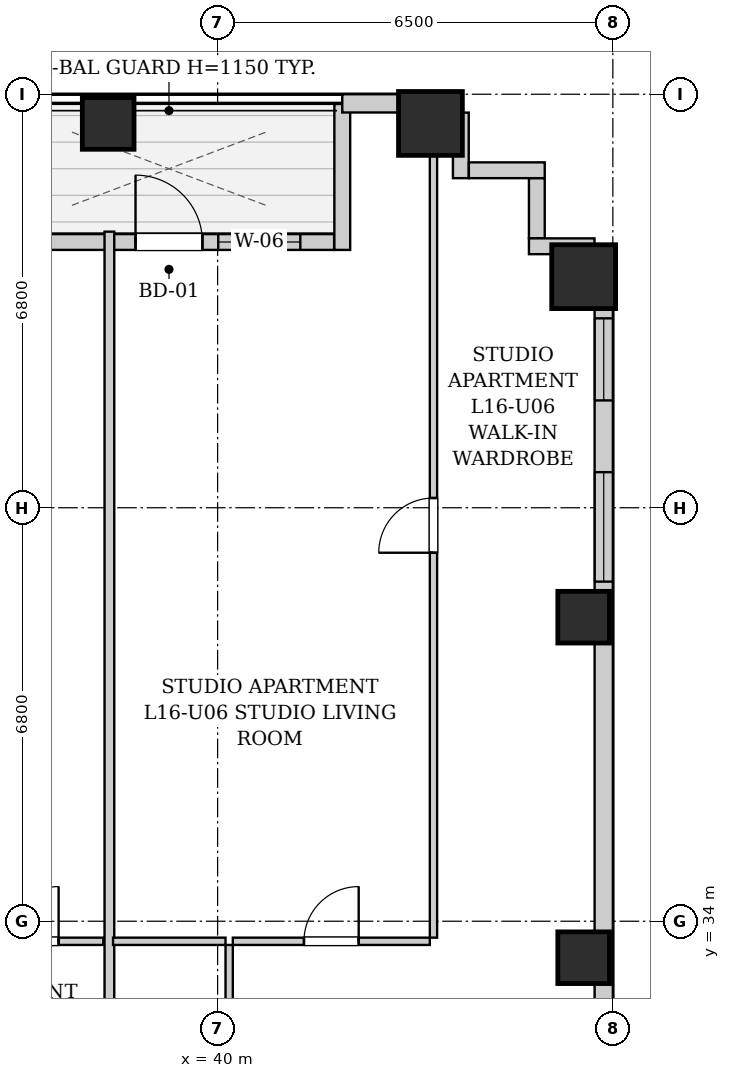
"""IFC4 building model, lengths in metres.
Left out: names, types, materials, properties, quantities, classifications, styles, units other than length and angle.
Written with IfcOpenShell. Run it as: python <this file> out.ifc"""

import sys

from ifc_helpers import new_model, si_unit, direction, frame, frame_2d, origin, origin_2d, place, context, subcontext, project, spatial, rectangle, extrude, element, fill, save


model = new_model("IFC4")
c1 = context("Model", 3, precision=1e-05, world=origin(), true_north=direction((0.0, 1.0)))
c2 = subcontext(c1, "Body", "Model", "MODEL_VIEW")
j1 = project(units=[si_unit("LENGTHUNIT", "METRE"), si_unit("PLANEANGLEUNIT", "RADIAN")], contexts=[c1])
p1 = place(None, origin())
s1 = spatial("IfcSite", under=j1, at=p1, CompositionType="ELEMENT")
p2 = place(p1, origin())
s2 = spatial("IfcBuilding", under=s1, at=p2, CompositionType="ELEMENT")
p3 = place(p2, frame((0.0, 0.0, 61.0)))
s3 = spatial("IfcBuildingStorey", under=s2, at=p3, CompositionType="ELEMENT", Elevation=61.0)
p4 = place(p3, frame((38.2, 47.12, 0.0), z_axis=(0.0, 0.0, 1.0), x_axis=(1.0, 0.0, 0.0)))
e1 = element("IfcColumn", 1, at=p4, inside=s3, PredefinedType="COLUMN", context=c2, shape_type="SweptSolid", body=[
    extrude(rectangle(XDim=0.85, YDim=0.85, at=origin_2d()), origin(), (0.0, 0.0, 1.0), 3.2),
])
p5 = place(p3, frame((43.5, 47.12, 0.0), z_axis=(0.0, 0.0, 1.0), x_axis=(1.0, 0.0, 0.0)))
e2 = element("IfcColumn", 2, at=p5, inside=s3, PredefinedType="COLUMN", context=c2, shape_type="SweptSolid", body=[
    extrude(rectangle(XDim=1.05, YDim=1.05, at=origin_2d()), origin(), (0.0, 0.0, 1.0), 3.2),
])
for number, where, z_axis, x_axis in (
    (3, (46.02, 33.4, 0.0), (0.0, 0.0, 1.0), (1.0, 0.0, 0.0)),
    (4, (46.02, 39.0, 0.0), (0.0, 0.0, 1.0), (1.0, 0.0, 0.0)),
):
    element("IfcColumn", number, at=place(p3, frame(where, z_axis=z_axis, x_axis=x_axis)), inside=s3, PredefinedType="COLUMN", context=c2, shape_type="SweptSolid", body=[
        extrude(rectangle(XDim=0.85, YDim=0.85, at=origin_2d()), origin(), (0.0, 0.0, 1.0), 3.2),
    ])
p6 = place(p3, frame((46.02, 44.6, 0.0), z_axis=(0.0, 0.0, 1.0), x_axis=(1.0, 0.0, 0.0)))
e5 = element("IfcColumn", 5, at=p6, inside=s3, PredefinedType="COLUMN", context=c2, shape_type="SweptSolid", body=[
    extrude(rectangle(XDim=1.05, YDim=1.05, at=origin_2d()), origin(), (0.0, 0.0, 1.0), 3.2),
])
p7 = place(p3, frame((36.484, 45.17, 0.0), z_axis=(0.0, 0.0, 1.0), x_axis=(1.0, 0.0, 0.0)))
e6 = element("IfcWall", 6, at=p7, inside=s3, PredefinedType="SOLIDWALL", context=c2, shape_type="SweptSolid", body=[
    extrude(rectangle(XDim=5.432, YDim=0.26, at=frame_2d((2.716, 0.0))), origin(), (0.0, 0.0, 1.0), 2.94),
])
p8 = place(p7, frame((2.166, 0.0, 0.0)))
e7 = element("IfcOpeningElement", 7, at=p8, cuts=e6, PredefinedType="OPENING", context=c2, shape_type="SweptSolid", body=[
    extrude(rectangle(XDim=1.1, YDim=2.0, at=frame_2d((0.55, 1.0))), frame((0.0, 0.14, 0.0), z_axis=(0.0, -1.0, 0.0), x_axis=(1.0, 0.0, 0.0)), (0.0, 0.0, 1.0), 0.28),
])
p9 = place(p7, frame((3.526, 0.0, 0.85)))
e8 = element("IfcOpeningElement", 8, at=p9, cuts=e6, PredefinedType="OPENING", context=c2, shape_type="SweptSolid", body=[
    extrude(rectangle(XDim=1.35, YDim=1.65, at=frame_2d((0.675, 0.825))), frame((0.0, 0.14, 0.0), z_axis=(0.0, -1.0, 0.0), x_axis=(1.0, 0.0, 0.0)), (0.0, 0.0, 1.0), 0.28),
])
p10 = place(p3, frame((42.05, 45.04, 0.0), z_axis=(0.0, 0.0, 1.0), x_axis=(0.0, 1.0, 0.0)))
e9 = element("IfcWall", 9, at=p10, inside=s3, PredefinedType="SOLIDWALL", context=c2, shape_type="SweptSolid", body=[
    extrude(rectangle(XDim=2.4, YDim=0.26, at=frame_2d((1.2, 0.0))), origin(), (0.0, 0.0, 1.0), 2.94),
])
p11 = place(p3, frame((42.05, 47.45, 0.0), z_axis=(0.0, 0.0, 1.0), x_axis=(1.0, 0.0, 0.0)))
e10 = element("IfcWall", 10, at=p11, inside=s3, PredefinedType="SOLIDWALL", context=c2, shape_type="SweptSolid", body=[
    extrude(rectangle(XDim=1.95, YDim=0.3, at=frame_2d((0.975, 0.0))), origin(), (0.0, 0.0, 1.0), 1.975),
])
p12 = place(p3, frame((46.35, 45.1, 0.0), z_axis=(0.0, 0.0, 1.0), x_axis=(0.0, -1.0, 0.0)))
e11 = element("IfcWall", 11, at=p12, inside=s3, PredefinedType="SOLIDWALL", context=c2, shape_type="SweptSolid", body=[
    extrude(rectangle(XDim=16.9, YDim=0.3, at=frame_2d((8.45, 0.0))), origin(), (0.0, 0.0, 1.0), 1.975),
])
p13 = place(p12, frame((3.715, 0.0, 0.55)))
e12 = element("IfcOpeningElement", 12, at=p13, cuts=e11, PredefinedType="OPENING", context=c2, shape_type="SweptSolid", body=[
    extrude(rectangle(XDim=1.8, YDim=1.2, at=frame_2d((0.9, 0.6))), frame((0.0, 0.16, 0.0), z_axis=(0.0, -1.0, 0.0), x_axis=(1.0, 0.0, 0.0)), (0.0, 0.0, 1.0), 0.32),
])
p14 = place(p12, frame((1.185, 0.0, 0.55)))
e13 = element("IfcOpeningElement", 13, at=p14, cuts=e11, PredefinedType="OPENING", context=c2, shape_type="SweptSolid", body=[
    extrude(rectangle(XDim=1.35, YDim=1.2, at=frame_2d((0.675, 0.6))), frame((0.0, 0.16, 0.0), z_axis=(0.0, -1.0, 0.0), x_axis=(1.0, 0.0, 0.0)), (0.0, 0.0, 1.0), 0.32),
])
p15 = place(p3, frame((44.0, 47.298, 0.0), z_axis=(0.0, 0.0, 1.0), x_axis=(0.0, -1.0, 0.0)))
e14 = element("IfcWall", 14, at=p15, inside=s3, PredefinedType="SOLIDWALL", context=c2, shape_type="SweptSolid", body=[
    extrude(rectangle(XDim=1.078, YDim=0.26, at=frame_2d((0.539, 0.0))), origin(), (0.0, 0.0, 1.0), 2.94),
])
p16 = place(p3, frame((44.132, 46.35, 0.0), z_axis=(0.0, 0.0, 1.0), x_axis=(1.0, 0.0, 0.0)))
e15 = element("IfcWall", 15, at=p16, inside=s3, PredefinedType="SOLIDWALL", context=c2, shape_type="SweptSolid", body=[
    extrude(rectangle(XDim=1.248, YDim=0.26, at=frame_2d((0.624, 0.0))), origin(), (0.0, 0.0, 1.0), 2.94),
])
p17 = place(p3, frame((45.25, 46.218, 0.0), z_axis=(0.0, 0.0, 1.0), x_axis=(0.0, -1.0, 0.0)))
e16 = element("IfcWall", 16, at=p17, inside=s3, PredefinedType="SOLIDWALL", context=c2, shape_type="SweptSolid", body=[
    extrude(rectangle(XDim=0.986, YDim=0.26, at=frame_2d((0.493, 0.0))), origin(), (0.0, 0.0, 1.0), 2.94),
])
p18 = place(p3, frame((45.12, 45.1, 0.0), z_axis=(0.0, 0.0, 1.0), x_axis=(1.0, 0.0, 0.0)))
e17 = element("IfcWall", 17, at=p18, inside=s3, PredefinedType="SOLIDWALL", context=c2, shape_type="SweptSolid", body=[
    extrude(rectangle(XDim=1.078, YDim=0.26, at=frame_2d((0.539, 0.0))), origin(), (0.0, 0.0, 1.0), 2.94),
])
p19 = place(p3, frame((35.75, 33.67, 0.0), z_axis=(0.0, 0.0, 1.0), x_axis=(1.0, 0.0, 0.0)))
e18 = element("IfcWall", 18, at=p19, inside=s3, PredefinedType="PARTITIONING", context=c2, shape_type="SweptSolid", body=[
    extrude(rectangle(XDim=2.37, YDim=0.12, at=frame_2d((1.185, 0.0))), origin(), (0.0, 0.0, 1.0), 2.94),
])
p20 = place(p19, frame((0.735, 0.0, 0.0)))
e19 = element("IfcOpeningElement", 19, at=p20, cuts=e18, PredefinedType="OPENING", context=c2, shape_type="SweptSolid", body=[
    extrude(rectangle(XDim=0.9, YDim=2.05, at=frame_2d((0.45, 1.025))), frame((0.0, 0.07, 0.0), z_axis=(0.0, -1.0, 0.0), x_axis=(1.0, 0.0, 0.0)), (0.0, 0.0, 1.0), 0.14),
])
p21 = place(p3, frame((38.22, 30.76, 0.0), z_axis=(0.0, 0.0, 1.0), x_axis=(0.0, 1.0, 0.0)))
e20 = element("IfcWall", 20, at=p21, inside=s3, PredefinedType="PARTITIONING", context=c2, shape_type="SweptSolid", body=[
    extrude(rectangle(XDim=14.58, YDim=0.16, at=frame_2d((7.29, 0.0))), origin(), (0.0, 0.0, 1.0), 2.94),
])
p22 = place(p3, frame((40.19, 30.76, 0.0), z_axis=(0.0, 0.0, 1.0), x_axis=(0.0, 1.0, 0.0)))
e21 = element("IfcWall", 21, at=p22, inside=s3, PredefinedType="PARTITIONING", context=c2, shape_type="SweptSolid", body=[
    extrude(rectangle(XDim=2.85, YDim=0.12, at=frame_2d((1.425, 0.0))), origin(), (0.0, 0.0, 1.0), 2.94),
])
p23 = place(p22, frame((0.995, 0.0, 0.0)))
e22 = element("IfcOpeningElement", 22, at=p23, cuts=e21, PredefinedType="OPENING", context=c2, shape_type="SweptSolid", body=[
    extrude(rectangle(XDim=0.86, YDim=2.05, at=frame_2d((0.43, 1.025))), frame((0.0, 0.07, 0.0), z_axis=(0.0, -1.0, 0.0), x_axis=(1.0, 0.0, 0.0)), (0.0, 0.0, 1.0), 0.14),
])
p24 = place(p3, frame((38.28, 33.67, 0.0), z_axis=(0.0, 0.0, 1.0), x_axis=(1.0, 0.0, 0.0)))
e23 = element("IfcWall", 23, at=p24, inside=s3, PredefinedType="PARTITIONING", context=c2, shape_type="SweptSolid", body=[
    extrude(rectangle(XDim=1.85, YDim=0.12, at=frame_2d((0.925, 0.0))), origin(), (0.0, 0.0, 1.0), 2.94),
])
p25 = place(p3, frame((40.25, 33.67, 0.0), z_axis=(0.0, 0.0, 1.0), x_axis=(1.0, 0.0, 0.0)))
e24 = element("IfcWall", 24, at=p25, inside=s3, PredefinedType="PARTITIONING", context=c2, shape_type="SweptSolid", body=[
    extrude(rectangle(XDim=3.24, YDim=0.12, at=frame_2d((1.62, 0.0))), origin(), (0.0, 0.0, 1.0), 2.94),
])
p26 = place(p25, frame((1.17, 0.0, 0.0)))
e25 = element("IfcOpeningElement", 25, at=p26, cuts=e24, PredefinedType="OPENING", context=c2, shape_type="SweptSolid", body=[
    extrude(rectangle(XDim=0.9, YDim=2.05, at=frame_2d((0.45, 1.025))), frame((0.0, 0.07, 0.0), z_axis=(0.0, -1.0, 0.0), x_axis=(1.0, 0.0, 0.0)), (0.0, 0.0, 1.0), 0.14),
])
p27 = place(p3, frame((43.55, 33.73, 0.0), z_axis=(0.0, 0.0, 1.0), x_axis=(0.0, 1.0, 0.0)))
e26 = element("IfcWall", 26, at=p27, inside=s3, PredefinedType="PARTITIONING", context=c2, shape_type="SweptSolid", body=[
    extrude(rectangle(XDim=13.59, YDim=0.12, at=frame_2d((6.795, 0.0))), origin(), (0.0, 0.0, 1.0), 2.94),
])
p28 = place(p27, frame((6.33, 0.0, 0.0)))
e27 = element("IfcOpeningElement", 27, at=p28, cuts=e26, PredefinedType="OPENING", context=c2, shape_type="SweptSolid", body=[
    extrude(rectangle(XDim=0.9, YDim=2.05, at=frame_2d((0.45, 1.025))), frame((0.0, 0.07, 0.0), z_axis=(0.0, -1.0, 0.0), x_axis=(1.0, 0.0, 0.0)), (0.0, 0.0, 1.0), 0.14),
])
p29 = place(p20, origin())
e28 = element("IfcDoor", 28, at=p29, inside=s3, OperationType="SINGLE_SWING_RIGHT", PredefinedType="DOOR", context=c2, shape_type="SweptSolid", body=[
    extrude(rectangle(XDim=0.9, YDim=2.05, at=frame_2d((0.45, 1.025))), frame((0.0, 0.025, 0.0), z_axis=(0.0, -1.0, 0.0), x_axis=(1.0, 0.0, 0.0)), (0.0, 0.0, 1.0), 0.05),
])
fill(e19, e28)
p30 = place(p26, origin())
e29 = element("IfcDoor", 29, at=p30, inside=s3, OperationType="SINGLE_SWING_RIGHT", PredefinedType="DOOR", context=c2, shape_type="SweptSolid", body=[
    extrude(rectangle(XDim=0.9, YDim=2.05, at=frame_2d((0.45, 1.025))), frame((0.0, 0.025, 0.0), z_axis=(0.0, -1.0, 0.0), x_axis=(1.0, 0.0, 0.0)), (0.0, 0.0, 1.0), 0.05),
])
fill(e25, e29)
p31 = place(p28, origin())
e30 = element("IfcDoor", 30, at=p31, inside=s3, OperationType="SINGLE_SWING_LEFT", PredefinedType="DOOR", context=c2, shape_type="SweptSolid", body=[
    extrude(rectangle(XDim=0.9, YDim=2.05, at=frame_2d((0.45, 1.025))), frame((0.0, 0.025, 0.0), z_axis=(0.0, -1.0, 0.0), x_axis=(1.0, 0.0, 0.0)), (0.0, 0.0, 1.0), 0.05),
])
fill(e27, e30)
p32 = place(p8, origin())
e31 = element("IfcDoor", 31, at=p32, inside=s3, OperationType="SINGLE_SWING_LEFT", PredefinedType="DOOR", context=c2, shape_type="SweptSolid", body=[
    extrude(rectangle(XDim=1.1, YDim=2.0, at=frame_2d((0.55, 1.0))), frame((0.0, 0.025, 0.0), z_axis=(0.0, -1.0, 0.0), x_axis=(1.0, 0.0, 0.0)), (0.0, 0.0, 1.0), 0.05),
])
fill(e7, e31)
p33 = place(p9, origin())
e32 = element("IfcWindow", 32, at=p33, inside=s3, PartitioningType="SINGLE_PANEL", PredefinedType="WINDOW", context=c2, shape_type="SweptSolid", body=[
    extrude(rectangle(XDim=1.35, YDim=1.65, at=frame_2d((0.675, 0.825))), frame((0.0, 0.03, 0.0), z_axis=(0.0, -1.0, 0.0), x_axis=(1.0, 0.0, 0.0)), (0.0, 0.0, 1.0), 0.06),
])
fill(e8, e32)
p34 = place(p13, origin())
e33 = element("IfcWindow", 33, at=p34, inside=s3, PartitioningType="DOUBLE_PANEL_VERTICAL", PredefinedType="WINDOW", context=c2, shape_type="SweptSolid", body=[
    extrude(rectangle(XDim=1.8, YDim=1.2, at=frame_2d((0.9, 0.6))), frame((0.0, 0.03, 0.0), z_axis=(0.0, -1.0, 0.0), x_axis=(1.0, 0.0, 0.0)), (0.0, 0.0, 1.0), 0.06),
])
fill(e12, e33)
p35 = place(p14, origin())
e34 = element("IfcWindow", 34, at=p35, inside=s3, PartitioningType="SINGLE_PANEL", PredefinedType="WINDOW", context=c2, shape_type="SweptSolid", body=[
    extrude(rectangle(XDim=1.35, YDim=1.2, at=frame_2d((0.675, 0.6))), frame((0.0, 0.03, 0.0), z_axis=(0.0, -1.0, 0.0), x_axis=(1.0, 0.0, 0.0)), (0.0, 0.0, 1.0), 0.06),
])
fill(e13, e34)
save(model, sys.argv[1])
